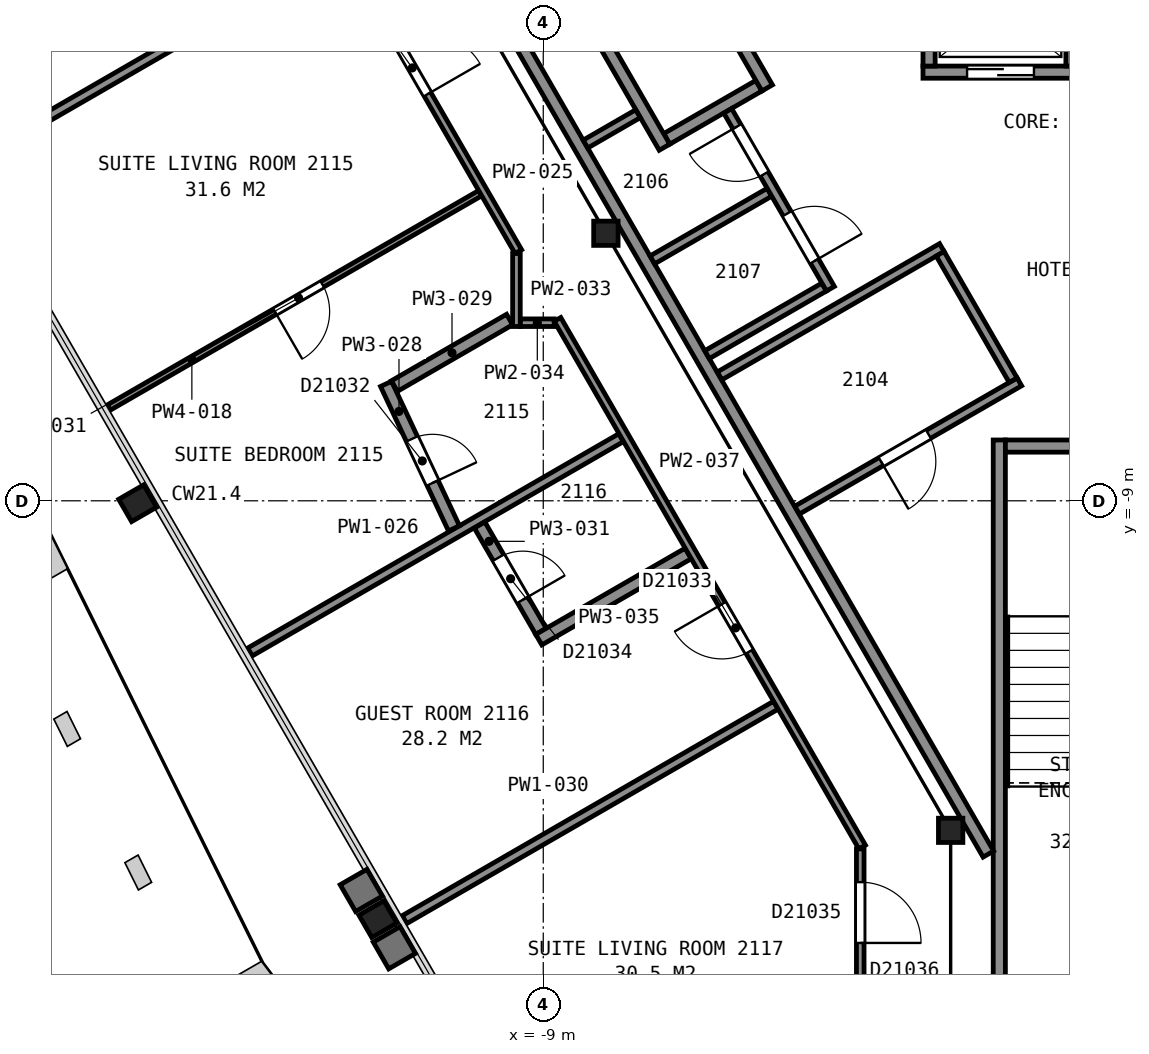
"""IFC4 building model, lengths in metres.
Left out: names, types, materials, properties, quantities, classifications, styles, units other than length and angle.
Written with IfcOpenShell. Run it as: python <this file> out.ifc"""

import sys

from ifc_helpers import new_model, si_unit, direction, frame, frame_2d, origin, origin_2d, place, context, subcontext, project, spatial, rectangle, i_section, extrude, element, fill, save


model = new_model("IFC4")
c1 = context("Model", 3, precision=1e-05, world=origin(), true_north=direction((0.0, 1.0)))
c2 = subcontext(c1, "Body", "Model", "MODEL_VIEW")
j1 = project(units=[si_unit("LENGTHUNIT", "METRE"), si_unit("PLANEANGLEUNIT", "RADIAN")], contexts=[c1])
p1 = place(None, origin())
s1 = spatial("IfcSite", under=j1, at=p1, CompositionType="ELEMENT")
p2 = place(p1, origin())
s2 = spatial("IfcBuilding", under=s1, at=p2, CompositionType="ELEMENT")
p3 = place(p2, frame((0.0, 0.0, 92.8)))
s3 = spatial("IfcBuildingStorey", under=s2, at=p3, CompositionType="ELEMENT", Elevation=92.8)
for number, where, z_axis, x_axis in (
    (1, (-15.67, -9.04, 0.0), (0.0, 0.0, 1.0), (-0.5, 0.866, 0.0)),
    (2, (-11.72, -15.88, 0.0), (0.0, 0.0, 1.0), (-0.5, 0.866, 0.0)),
):
    element("IfcColumn", number, at=place(p3, frame(where, z_axis=z_axis, x_axis=x_axis)), inside=s3, PredefinedType="COLUMN", context=c2, shape_type="SweptSolid", body=[
        extrude(i_section(OverallWidth=0.424, OverallDepth=0.475, WebThickness=0.048, FlangeThickness=0.077, FilletRadius=0.015, at=origin_2d()), origin(), (0.0, 0.0, 1.0), 3.6),
    ])
for number, where, z_axis, x_axis in (
    (3, (-7.97, -4.6, 0.0), (0.0, 0.0, 1.0), (1.0, 0.0, 0.0)),
    (4, (-2.3, -14.42, 0.0), (0.0, 0.0, 1.0), (1.0, 0.0, 0.0)),
):
    element("IfcColumn", number, at=place(p3, frame(where, z_axis=z_axis, x_axis=x_axis)), inside=s3, PredefinedType="COLUMN", context=c2, shape_type="SweptSolid", body=[
        extrude(i_section(OverallWidth=0.401, OverallDepth=0.399, WebThickness=0.025, FlangeThickness=0.04, FilletRadius=0.015, at=origin_2d()), origin(), (0.0, 0.0, 1.0), 3.6),
    ])
p4 = place(p3, frame((-1.5, -8.0, 0.0), z_axis=(0.0, 0.0, 1.0), x_axis=(0.0, -1.0, 0.0)))
e5 = element("IfcWall", 5, at=p4, inside=s3, PredefinedType="PARTITIONING", context=c2, shape_type="SweptSolid", body=[
    extrude(rectangle(XDim=12.0, YDim=0.2, at=frame_2d((6.0, 0.0))), origin(), (0.0, 0.0, 1.0), 3.35),
])
p5 = place(p3, frame((-1.4, -8.1, 0.0), z_axis=(0.0, 0.0, 1.0), x_axis=(1.0, 0.0, 0.0)))
e6 = element("IfcWall", 6, at=p5, inside=s3, PredefinedType="PARTITIONING", context=c2, shape_type="SweptSolid", body=[
    extrude(rectangle(XDim=2.8, YDim=0.2, at=frame_2d((1.4, 0.0))), origin(), (0.0, 0.0, 1.0), 3.35),
])
p6 = place(p3, frame((-2.755, -1.95, 0.0), z_axis=(0.0, 0.0, 1.0), x_axis=(1.0, 0.0, 0.0)))
e7 = element("IfcWall", 7, at=p6, inside=s3, PredefinedType="PARTITIONING", context=c2, shape_type="SweptSolid", body=[
    extrude(rectangle(XDim=2.55, YDim=0.2, at=frame_2d((1.275, 0.0))), origin(), (0.0, 0.0, 1.0), 3.6),
])
p7 = place(p6, frame((0.725, 0.0, 0.0)))
e8 = element("IfcOpeningElement", 8, at=p7, cuts=e7, PredefinedType="OPENING", context=c2, shape_type="SweptSolid", body=[
    extrude(rectangle(XDim=1.1, YDim=2.1, at=frame_2d((0.55, 1.05))), frame((0.0, 0.11, 0.0), z_axis=(0.0, -1.0, 0.0), x_axis=(1.0, 0.0, 0.0)), (0.0, 0.0, 1.0), 0.22),
])
for number, where, z_axis, x_axis in (
    (9, (-6.97, -3.048, 0.0), (0.0, 0.0, 1.0), (0.866, 0.5, 0.0)),
    (10, (-0.305, -1.85, 0.0), (0.0, 0.0, 1.0), (0.0, 1.0, 0.0)),
    (11, (-2.655, -1.85, 0.0), (0.0, 0.0, 1.0), (0.0, 1.0, 0.0)),
):
    element("IfcWall", number, at=place(p3, frame(where, z_axis=z_axis, x_axis=x_axis)), inside=s3, PredefinedType="PARTITIONING", context=c2, shape_type="SweptSolid", body=[
        extrude(rectangle(XDim=1.75, YDim=0.2, at=frame_2d((0.875, 0.0))), origin(), (0.0, 0.0, 1.0), 3.6),
    ])
p8 = place(p3, frame((-5.318, -2.21, 0.0), z_axis=(0.0, 0.0, 1.0), x_axis=(-0.499938297808, 0.866061024631, 0.0)))
e12 = element("IfcWall", 12, at=p8, inside=s3, PredefinedType="PARTITIONING", context=c2, shape_type="SweptSolid", body=[
    extrude(rectangle(XDim=2.35, YDim=0.2, at=frame_2d((1.175, 0.0))), origin(), (0.0, 0.0, 1.0), 3.6),
])
p9 = place(p3, frame((-7.006, -3.185, 0.0), z_axis=(0.0, 0.0, 1.0), x_axis=(-0.499990435942, 0.866030925526, 0.0)))
e13 = element("IfcWall", 13, at=p9, inside=s3, PredefinedType="PARTITIONING", context=c2, shape_type="SweptSolid", body=[
    extrude(rectangle(XDim=2.55, YDim=0.2, at=frame_2d((1.275, 0.0))), origin(), (0.0, 0.0, 1.0), 3.6),
])
p10 = place(p3, frame((-13.664, 5.946, 0.0), z_axis=(0.0, 0.0, 1.0), x_axis=(0.499994327219, -0.866028678941, 0.0)))
e14 = element("IfcWall", 14, at=p10, inside=s3, PredefinedType="PARTITIONING", context=c2, shape_type="SweptSolid", body=[
    extrude(rectangle(XDim=23.968, YDim=0.2, at=frame_2d((11.984, 0.0))), origin(), (0.0, 0.0, 1.0), 3.35),
])
p11 = place(p3, frame((-8.306, -3.133, 0.0), z_axis=(0.0, 0.0, 1.0), x_axis=(0.86606747808, 0.499927118101, 0.0)))
e15 = element("IfcWall", 15, at=p11, inside=s3, PredefinedType="PARTITIONING", context=c2, shape_type="SweptSolid", body=[
    extrude(rectangle(XDim=0.998, YDim=0.15, at=frame_2d((0.499, 0.0))), origin(), (0.0, 0.0, 1.0), 3.35),
])
p12 = place(p3, frame((-7.206, -5.038, 0.0), z_axis=(0.0, 0.0, 1.0), x_axis=(0.865944298464, 0.500140452231, 0.0)))
e16 = element("IfcWall", 16, at=p12, inside=s3, PredefinedType="PARTITIONING", context=c2, shape_type="SweptSolid", body=[
    extrude(rectangle(XDim=2.224, YDim=0.15, at=frame_2d((1.112, 0.0))), origin(), (0.0, 0.0, 1.0), 3.35),
])
p13 = place(p3, frame((-6.306, -6.597, 0.0), z_axis=(0.0, 0.0, 1.0), x_axis=(0.866019272134, 0.50001062018, 0.0)))
e17 = element("IfcWall", 17, at=p13, inside=s3, PredefinedType="PARTITIONING", context=c2, shape_type="SweptSolid", body=[
    extrude(rectangle(XDim=2.225, YDim=0.15, at=frame_2d((1.112, 0.0))), origin(), (0.0, 0.0, 1.0), 3.35),
])
p14 = place(p3, frame((-6.1, -6.946, 0.0), z_axis=(0.0, 0.0, 1.0), x_axis=(0.866038200431, 0.499977834903, 0.0)))
e18 = element("IfcWall", 18, at=p14, inside=s3, PredefinedType="PARTITIONING", context=c2, shape_type="SweptSolid", body=[
    extrude(rectangle(XDim=4.22, YDim=0.15, at=frame_2d((2.11, 0.0))), origin(), (0.0, 0.0, 1.0), 3.35),
])
p15 = place(p3, frame((-4.278, -5.512, 0.0), z_axis=(0.0, 0.0, 1.0), x_axis=(-0.499933120428, 0.86606401328, 0.0)))
e19 = element("IfcWall", 19, at=p15, inside=s3, PredefinedType="PARTITIONING", context=c2, shape_type="SweptSolid", body=[
    extrude(rectangle(XDim=3.377, YDim=0.15, at=frame_2d((1.689, 0.0))), origin(), (0.0, 0.0, 1.0), 3.35),
])
p16 = place(p15, frame((2.177, 0.0, 0.0)))
e20 = element("IfcOpeningElement", 20, at=p16, cuts=e19, PredefinedType="OPENING", context=c2, shape_type="SweptSolid", body=[
    extrude(rectangle(XDim=0.9, YDim=2.1, at=frame_2d((0.45, 1.05))), frame((0.0, 0.085, 0.0), z_axis=(0.0, -1.0, 0.0), x_axis=(1.0, 0.0, 0.0)), (0.0, 0.0, 1.0), 0.17),
])
p17 = place(p15, frame((0.525, 0.0, 0.0)))
e21 = element("IfcOpeningElement", 21, at=p17, cuts=e19, PredefinedType="OPENING", context=c2, shape_type="SweptSolid", body=[
    extrude(rectangle(XDim=0.9, YDim=2.1, at=frame_2d((0.45, 1.05))), frame((0.0, 0.085, 0.0), z_axis=(0.0, -1.0, 0.0), x_axis=(1.0, 0.0, 0.0)), (0.0, 0.0, 1.0), 0.17),
])
p18 = place(p3, frame((-4.825, -9.154, 0.0), z_axis=(0.0, 0.0, 1.0), x_axis=(0.866023738697, 0.500002884005, 0.0)))
e22 = element("IfcWall", 22, at=p18, inside=s3, PredefinedType="PARTITIONING", context=c2, shape_type="SweptSolid", body=[
    extrude(rectangle(XDim=4.22, YDim=0.15, at=frame_2d((2.11, 0.0))), origin(), (0.0, 0.0, 1.0), 3.35),
])
p19 = place(p18, frame((1.595, 0.0, 0.0)))
e23 = element("IfcOpeningElement", 23, at=p19, cuts=e22, PredefinedType="OPENING", context=c2, shape_type="SweptSolid", body=[
    extrude(rectangle(XDim=0.9, YDim=2.1, at=frame_2d((0.45, 1.05))), frame((0.0, 0.085, 0.0), z_axis=(0.0, -1.0, 0.0), x_axis=(1.0, 0.0, 0.0)), (0.0, 0.0, 1.0), 0.17),
])
p20 = place(p3, frame((-2.472, -4.938, 0.0), z_axis=(0.0, 0.0, 1.0), x_axis=(0.500045362686, -0.865999212041, 0.0)))
e24 = element("IfcWall", 24, at=p20, inside=s3, PredefinedType="PARTITIONING", context=c2, shape_type="SweptSolid", body=[
    extrude(rectangle(XDim=2.4, YDim=0.15, at=frame_2d((1.2, 0.0))), origin(), (0.0, 0.0, 1.0), 3.35),
])
p21 = place(p3, frame((-18.466, -3.445, 0.0), z_axis=(0.0, 0.0, 1.0), x_axis=(0.86605175433, 0.499954356739, 0.0)))
e25 = element("IfcWall", 25, at=p21, inside=s3, PredefinedType="PARTITIONING", context=c2, shape_type="SweptSolid", body=[
    extrude(rectangle(XDim=7.048, YDim=0.15, at=frame_2d((3.524, 0.0))), origin(), (0.0, 0.0, 1.0), 2.613),
])
p22 = place(p3, frame((-10.037, -3.94, 0.0), z_axis=(0.0, 0.0, 1.0), x_axis=(-0.866063951978, -0.499933226626, 0.0)))
e26 = element("IfcWall", 26, at=p22, inside=s3, PredefinedType="PARTITIONING", context=c2, shape_type="SweptSolid", body=[
    extrude(rectangle(XDim=7.052, YDim=0.1, at=frame_2d((3.526, 0.0))), origin(), (0.0, 0.0, 1.0), 2.613),
])
p23 = place(p22, frame((2.998, 0.0, 0.0)))
e27 = element("IfcOpeningElement", 27, at=p23, cuts=e26, PredefinedType="OPENING", context=c2, shape_type="SweptSolid", body=[
    extrude(rectangle(XDim=0.9, YDim=2.1, at=frame_2d((0.45, 1.05))), frame((0.0, 0.06, 0.0), z_axis=(0.0, -1.0, 0.0), x_axis=(1.0, 0.0, 0.0)), (0.0, 0.0, 1.0), 0.12),
])
p24 = place(p3, frame((-9.41, -4.902, 0.0), z_axis=(0.0, 0.0, 1.0), x_axis=(-0.499971244726, 0.866042005013, 0.0)))
e28 = element("IfcWall", 28, at=p24, inside=s3, PredefinedType="PARTITIONING", context=c2, shape_type="SweptSolid", body=[
    extrude(rectangle(XDim=10.052, YDim=0.125, at=frame_2d((5.026, 0.0))), origin(), (0.0, 0.0, 1.0), 2.613),
])
p25 = place(p24, frame((6.608, 0.0, 0.0)))
e29 = element("IfcOpeningElement", 29, at=p25, cuts=e28, PredefinedType="OPENING", context=c2, shape_type="SweptSolid", body=[
    extrude(rectangle(XDim=1.0, YDim=2.1, at=frame_2d((0.5, 1.05))), frame((0.0, 0.073, 0.0), z_axis=(0.0, -1.0, 0.0), x_axis=(1.0, 0.0, 0.0)), (0.0, 0.0, 1.0), 0.145),
])
p26 = place(p24, frame((2.989, 0.0, 0.0)))
e30 = element("IfcOpeningElement", 30, at=p26, cuts=e28, PredefinedType="OPENING", context=c2, shape_type="SweptSolid", body=[
    extrude(rectangle(XDim=1.0, YDim=2.1, at=frame_2d((0.5, 1.05))), frame((0.0, 0.073, 0.0), z_axis=(0.0, -1.0, 0.0), x_axis=(1.0, 0.0, 0.0)), (0.0, 0.0, 1.0), 0.145),
])
p27 = place(p3, frame((-13.823, -11.487, 0.0), z_axis=(0.0, 0.0, 1.0), x_axis=(0.865980767462, 0.500077304409, 0.0)))
e31 = element("IfcWall", 31, at=p27, inside=s3, PredefinedType="PARTITIONING", context=c2, shape_type="SweptSolid", body=[
    extrude(rectangle(XDim=7.047, YDim=0.15, at=frame_2d((3.524, 0.0))), origin(), (0.0, 0.0, 1.0), 2.613),
])
p28 = place(p3, frame((-11.585, -7.077, 0.0), z_axis=(0.0, 0.0, 1.0), x_axis=(0.425434257814, -0.904989332688, 0.0)))
e32 = element("IfcWall", 32, at=p28, inside=s3, PredefinedType="PARTITIONING", context=c2, shape_type="SweptSolid", body=[
    extrude(rectangle(XDim=2.625, YDim=0.2, at=frame_2d((1.313, 0.0))), origin(), (0.0, 0.0, 1.0), 2.613),
])
p29 = place(p28, frame((1.0, 0.0, 0.0)))
e33 = element("IfcOpeningElement", 33, at=p29, cuts=e32, PredefinedType="OPENING", context=c2, shape_type="SweptSolid", body=[
    extrude(rectangle(XDim=0.8, YDim=2.1, at=frame_2d((0.4, 1.05))), frame((0.0, 0.11, 0.0), z_axis=(0.0, -1.0, 0.0), x_axis=(1.0, 0.0, 0.0)), (0.0, 0.0, 1.0), 0.22),
])
p30 = place(p3, frame((-11.448, -7.113, 0.0), z_axis=(0.0, 0.0, 1.0), x_axis=(0.865960673566, 0.500112099272, 0.0)))
e34 = element("IfcWall", 34, at=p30, inside=s3, PredefinedType="PARTITIONING", context=c2, shape_type="SweptSolid", body=[
    extrude(rectangle(XDim=2.188, YDim=0.2, at=frame_2d((1.094, 0.0))), origin(), (0.0, 0.0, 1.0), 2.613),
])
p31 = place(p3, frame((-11.282, -15.888, 0.0), z_axis=(0.0, 0.0, 1.0), x_axis=(0.866031654768, 0.499989172823, 0.0)))
e35 = element("IfcWall", 35, at=p31, inside=s3, PredefinedType="PARTITIONING", context=c2, shape_type="SweptSolid", body=[
    extrude(rectangle(XDim=7.052, YDim=0.15, at=frame_2d((3.526, 0.0))), origin(), (0.0, 0.0, 1.0), 2.613),
])
p32 = place(p3, frame((-10.047, -9.398, 0.0), z_axis=(0.0, 0.0, 1.0), x_axis=(0.499935208997, -0.866062807656, 0.0)))
e36 = element("IfcWall", 36, at=p32, inside=s3, PredefinedType="PARTITIONING", context=c2, shape_type="SweptSolid", body=[
    extrude(rectangle(XDim=2.02, YDim=0.2, at=frame_2d((1.01, 0.0))), origin(), (0.0, 0.0, 1.0), 2.613),
])
p33 = place(p32, frame((0.62, 0.0, 0.0)))
e37 = element("IfcOpeningElement", 37, at=p33, cuts=e36, PredefinedType="OPENING", context=c2, shape_type="SweptSolid", body=[
    extrude(rectangle(XDim=0.8, YDim=2.1, at=frame_2d((0.4, 1.05))), frame((0.0, 0.11, 0.0), z_axis=(0.0, -1.0, 0.0), x_axis=(1.0, 0.0, 0.0)), (0.0, 0.0, 1.0), 0.22),
])
p34 = place(p3, frame((-9.441, -6.134, 0.0), z_axis=(0.0, 0.0, 1.0), x_axis=(0.0, 1.0, 0.0)))
e38 = element("IfcWall", 38, at=p34, inside=s3, PredefinedType="PARTITIONING", context=c2, shape_type="SweptSolid", body=[
    extrude(rectangle(XDim=1.2, YDim=0.125, at=frame_2d((0.6, 0.0))), origin(), (0.0, 0.0, 1.0), 2.613),
])
p35 = place(p3, frame((-9.376, -6.071, 0.0), z_axis=(0.0, 0.0, 1.0), x_axis=(1.0, 0.0, 0.0)))
e39 = element("IfcWall", 39, at=p35, inside=s3, PredefinedType="PARTITIONING", context=c2, shape_type="SweptSolid", body=[
    extrude(rectangle(XDim=0.556, YDim=0.125, at=frame_2d((0.278, 0.0))), origin(), (0.0, 0.0, 1.0), 2.613),
])
p36 = place(p3, frame((-9.074, -11.284, 0.0), z_axis=(0.0, 0.0, 1.0), x_axis=(0.866197046655, 0.499702587912, 0.0)))
e40 = element("IfcWall", 40, at=p36, inside=s3, PredefinedType="PARTITIONING", context=c2, shape_type="SweptSolid", body=[
    extrude(rectangle(XDim=2.837, YDim=0.2, at=frame_2d((1.418, 0.0))), origin(), (0.0, 0.0, 1.0), 2.613),
])
p37 = place(p3, frame((-3.756, -14.694, 0.0), z_axis=(0.0, 0.0, 1.0), x_axis=(-0.500051472265, 0.865995684219, 0.0)))
e41 = element("IfcWall", 41, at=p37, inside=s3, PredefinedType="PARTITIONING", context=c2, shape_type="SweptSolid", body=[
    extrude(rectangle(XDim=10.02, YDim=0.125, at=frame_2d((5.01, 0.0))), origin(), (0.0, 0.0, 1.0), 2.613),
])
p38 = place(p37, frame((3.711, 0.0, 0.0)))
e42 = element("IfcOpeningElement", 42, at=p38, cuts=e41, PredefinedType="OPENING", context=c2, shape_type="SweptSolid", body=[
    extrude(rectangle(XDim=0.9, YDim=2.1, at=frame_2d((0.45, 1.05))), frame((0.0, 0.073, 0.0), z_axis=(0.0, -1.0, 0.0), x_axis=(1.0, 0.0, 0.0)), (0.0, 0.0, 1.0), 0.145),
])
p39 = place(p3, frame((-3.787, -22.85, 0.0), z_axis=(0.0, 0.0, 1.0), x_axis=(0.0, 1.0, 0.0)))
e43 = element("IfcWall", 43, at=p39, inside=s3, PredefinedType="PARTITIONING", context=c2, shape_type="SweptSolid", body=[
    extrude(rectangle(XDim=8.125, YDim=0.125, at=frame_2d((4.062, 0.0))), origin(), (0.0, 0.0, 1.0), 2.613),
])
p40 = place(p39, frame((6.577, 0.0, 0.0)))
e44 = element("IfcOpeningElement", 44, at=p40, cuts=e43, PredefinedType="OPENING", context=c2, shape_type="SweptSolid", body=[
    extrude(rectangle(XDim=1.0, YDim=2.1, at=frame_2d((0.5, 1.05))), frame((0.0, 0.073, 0.0), z_axis=(0.0, -1.0, 0.0), x_axis=(1.0, 0.0, 0.0)), (0.0, 0.0, 1.0), 0.145),
])
p41 = place(p7, origin())
e45 = element("IfcDoor", 45, at=p41, inside=s3, OperationType="SLIDING_TO_RIGHT", PredefinedType="DOOR", context=c2, shape_type="SweptSolid", body=[
    extrude(rectangle(XDim=1.1, YDim=2.1, at=frame_2d((0.55, 1.05))), frame((0.0, 0.025, 0.0), z_axis=(0.0, -1.0, 0.0), x_axis=(1.0, 0.0, 0.0)), (0.0, 0.0, 1.0), 0.05),
])
fill(e8, e45)
p42 = place(p16, origin())
e46 = element("IfcDoor", 46, at=p42, inside=s3, OperationType="SINGLE_SWING_RIGHT", PredefinedType="DOOR", context=c2, shape_type="SweptSolid", body=[
    extrude(rectangle(XDim=0.9, YDim=2.1, at=frame_2d((0.45, 1.05))), frame((0.0, 0.025, 0.0), z_axis=(0.0, -1.0, 0.0), x_axis=(1.0, 0.0, 0.0)), (0.0, 0.0, 1.0), 0.05),
])
fill(e20, e46)
p43 = place(p17, origin())
e47 = element("IfcDoor", 47, at=p43, inside=s3, OperationType="SINGLE_SWING_LEFT", PredefinedType="DOOR", context=c2, shape_type="SweptSolid", body=[
    extrude(rectangle(XDim=0.9, YDim=2.1, at=frame_2d((0.45, 1.05))), frame((0.0, 0.025, 0.0), z_axis=(0.0, -1.0, 0.0), x_axis=(1.0, 0.0, 0.0)), (0.0, 0.0, 1.0), 0.05),
])
fill(e21, e47)
p44 = place(p19, origin())
e48 = element("IfcDoor", 48, at=p44, inside=s3, OperationType="SINGLE_SWING_LEFT", PredefinedType="DOOR", context=c2, shape_type="SweptSolid", body=[
    extrude(rectangle(XDim=0.9, YDim=2.1, at=frame_2d((0.45, 1.05))), frame((0.0, 0.025, 0.0), z_axis=(0.0, -1.0, 0.0), x_axis=(1.0, 0.0, 0.0)), (0.0, 0.0, 1.0), 0.05),
])
fill(e23, e48)
p45 = place(p23, origin())
e49 = element("IfcDoor", 49, at=p45, inside=s3, OperationType="SINGLE_SWING_RIGHT", PredefinedType="DOOR", context=c2, shape_type="SweptSolid", body=[
    extrude(rectangle(XDim=0.9, YDim=2.1, at=frame_2d((0.45, 1.05))), frame((0.0, 0.025, 0.0), z_axis=(0.0, -1.0, 0.0), x_axis=(1.0, 0.0, 0.0)), (0.0, 0.0, 1.0), 0.05),
])
fill(e27, e49)
p46 = place(p26, origin())
e50 = element("IfcDoor", 50, at=p46, inside=s3, OperationType="SINGLE_SWING_LEFT", PredefinedType="DOOR", context=c2, shape_type="SweptSolid", body=[
    extrude(rectangle(XDim=1.0, YDim=2.1, at=frame_2d((0.5, 1.05))), frame((0.0, 0.025, 0.0), z_axis=(0.0, -1.0, 0.0), x_axis=(1.0, 0.0, 0.0)), (0.0, 0.0, 1.0), 0.05),
])
fill(e30, e50)
p47 = place(p29, origin())
e51 = element("IfcDoor", 51, at=p47, inside=s3, OperationType="SINGLE_SWING_RIGHT", PredefinedType="DOOR", context=c2, shape_type="SweptSolid", body=[
    extrude(rectangle(XDim=0.8, YDim=2.1, at=frame_2d((0.4, 1.05))), frame((0.0, 0.025, 0.0), z_axis=(0.0, -1.0, 0.0), x_axis=(1.0, 0.0, 0.0)), (0.0, 0.0, 1.0), 0.05),
])
fill(e33, e51)
p48 = place(p33, origin())
e52 = element("IfcDoor", 52, at=p48, inside=s3, OperationType="SINGLE_SWING_RIGHT", PredefinedType="DOOR", context=c2, shape_type="SweptSolid", body=[
    extrude(rectangle(XDim=0.8, YDim=2.1, at=frame_2d((0.4, 1.05))), frame((0.0, 0.025, 0.0), z_axis=(0.0, -1.0, 0.0), x_axis=(1.0, 0.0, 0.0)), (0.0, 0.0, 1.0), 0.05),
])
fill(e37, e52)
p49 = place(p38, origin())
e53 = element("IfcDoor", 53, at=p49, inside=s3, OperationType="SINGLE_SWING_RIGHT", PredefinedType="DOOR", context=c2, shape_type="SweptSolid", body=[
    extrude(rectangle(XDim=0.9, YDim=2.1, at=frame_2d((0.45, 1.05))), frame((0.0, 0.025, 0.0), z_axis=(0.0, -1.0, 0.0), x_axis=(1.0, 0.0, 0.0)), (0.0, 0.0, 1.0), 0.05),
])
fill(e42, e53)
p50 = place(p40, origin())
e54 = element("IfcDoor", 54, at=p50, inside=s3, OperationType="SINGLE_SWING_LEFT", PredefinedType="DOOR", context=c2, shape_type="SweptSolid", body=[
    extrude(rectangle(XDim=1.0, YDim=2.1, at=frame_2d((0.5, 1.05))), frame((0.0, 0.025, 0.0), z_axis=(0.0, -1.0, 0.0), x_axis=(1.0, 0.0, 0.0)), (0.0, 0.0, 1.0), 0.05),
])
fill(e44, e54)
save(model, sys.argv[1])
